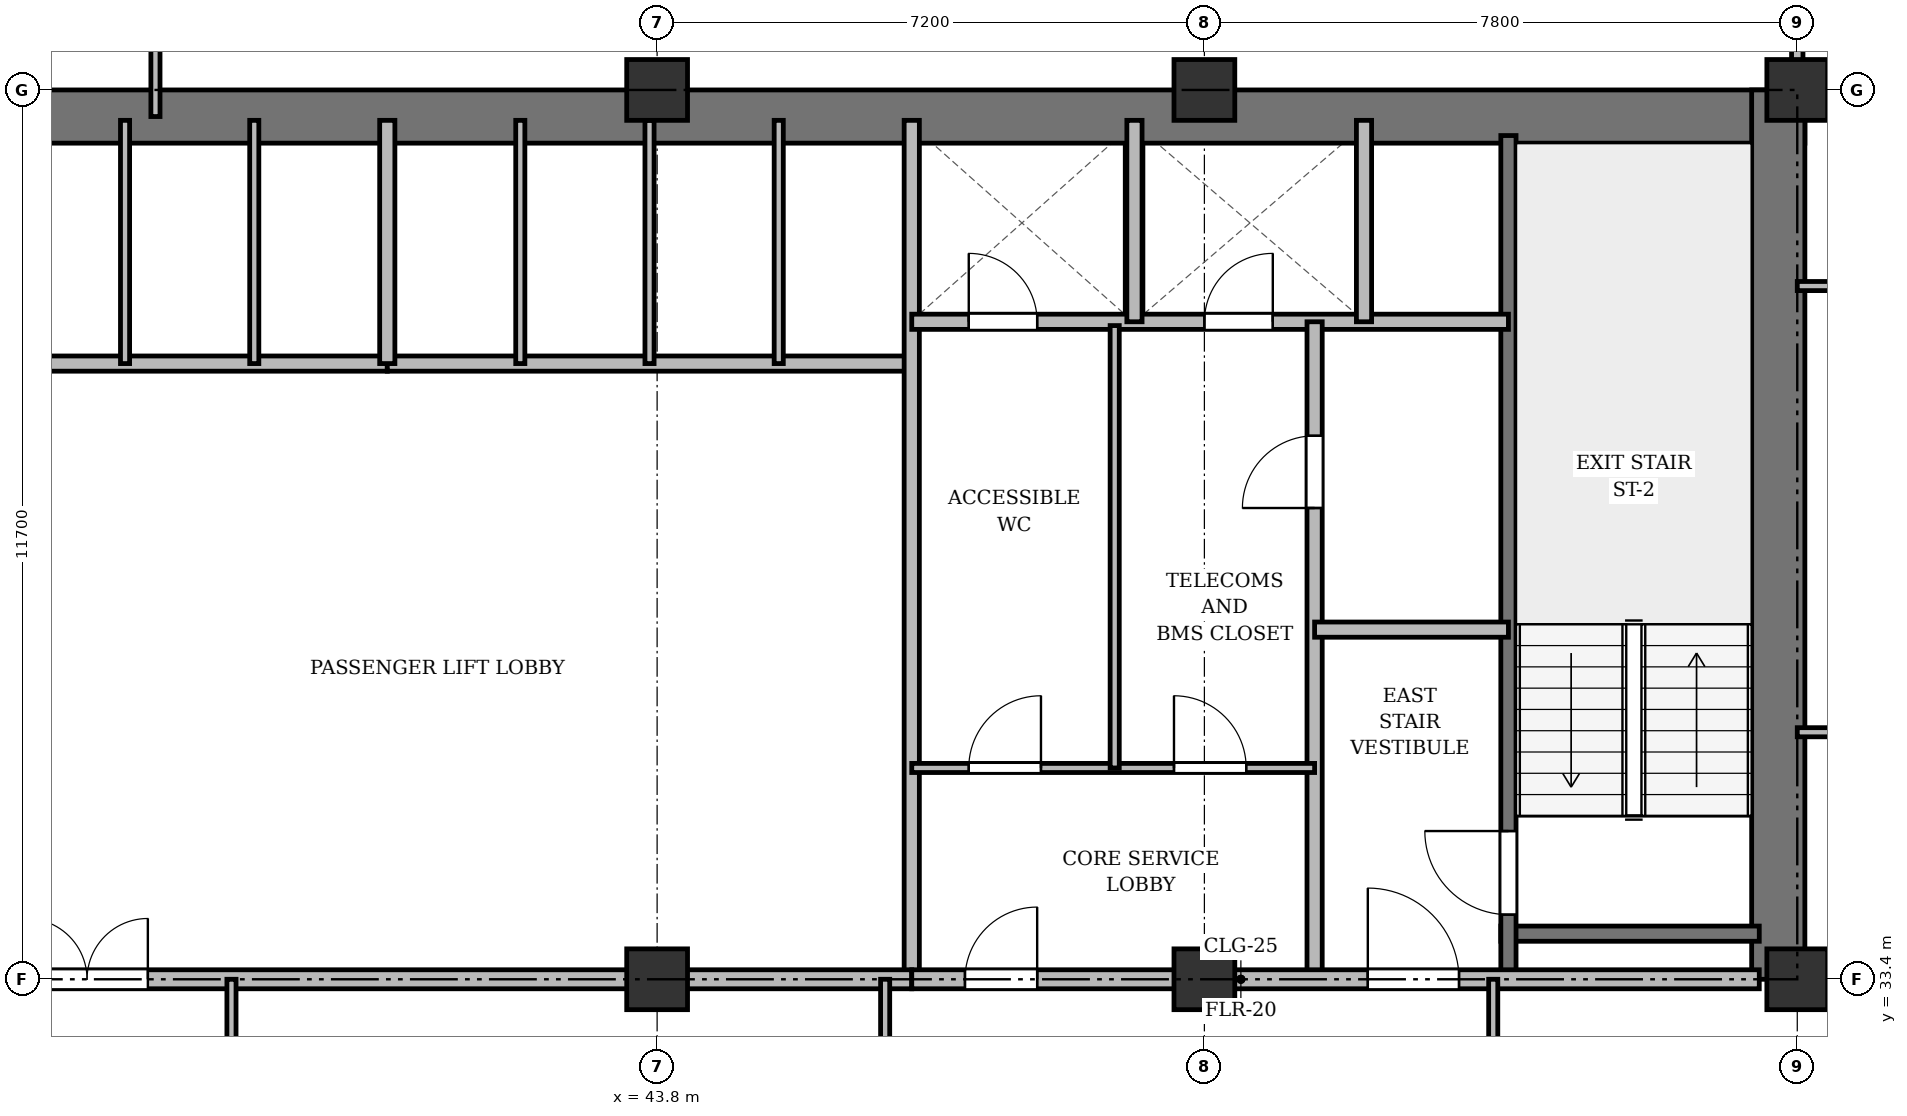
"""IFC4 building model, lengths in metres.
Left out: names, types, materials, properties, quantities, classifications, styles, units other than length and angle.
Written with IfcOpenShell. Run it as: python <this file> out.ifc"""

import sys

from ifc_helpers import new_model, si_unit, direction, frame, frame_2d, origin, origin_2d, place, context, subcontext, project, spatial, rectangle, extrude, source, transform, mapped, element, fill, save


model = new_model("IFC4")
c1 = context("Model", 3, precision=1e-05, world=origin(), true_north=direction((0.0, 1.0)))
c2 = subcontext(c1, "Body", "Model", "MODEL_VIEW")
j1 = project(units=[si_unit("LENGTHUNIT", "METRE"), si_unit("PLANEANGLEUNIT", "RADIAN")], contexts=[c1])
p1 = place(None, origin())
s1 = spatial("IfcSite", under=j1, at=p1, CompositionType="ELEMENT")
p2 = place(p1, origin())
s2 = spatial("IfcBuilding", under=s1, at=p2, CompositionType="ELEMENT")
p3 = place(p2, frame((0.0, 0.0, 81.7)))
s3 = spatial("IfcBuildingStorey", under=s2, at=p3, CompositionType="ELEMENT", Elevation=81.7)
m1 = source(origin(), c2, "Body", "SweptSolid", [
    extrude(rectangle(XDim=0.8, YDim=0.8, at=origin_2d()), origin(), (0.0, 0.0, 1.0), 3.6),
])
for number, where, z_axis, x_axis in (
    (1, (43.8, 33.4, 0.0), (0.0, 0.0, 1.0), (1.0, 0.0, 0.0)),
    (2, (43.8, 45.1, 0.0), (0.0, 0.0, 1.0), (1.0, 0.0, 0.0)),
    (3, (51.0, 33.4, 0.0), (0.0, 0.0, 1.0), (1.0, 0.0, 0.0)),
    (4, (51.0, 45.1, 0.0), (0.0, 0.0, 1.0), (1.0, 0.0, 0.0)),
    (5, (58.8, 33.4, 0.0), (0.0, 0.0, 1.0), (1.0, 0.0, 0.0)),
    (6, (58.8, 45.1, 0.0), (0.0, 0.0, 1.0), (1.0, 0.0, 0.0)),
):
    element("IfcColumn", number, at=place(p3, frame(where, z_axis=z_axis, x_axis=x_axis)), inside=s3, PredefinedType="COLUMN", context=c2, shape_type="MappedRepresentation", body=[
        mapped(m1, transform((0.0, 0.0, 0.0), x_axis=(1.0, 0.0, 0.0), y_axis=(0.0, 1.0, 0.0), z_axis=(0.0, 0.0, 1.0), scale=1.0)),
    ])
p4 = place(p3, frame((15.5, 44.75, 0.0), z_axis=(0.0, 0.0, 1.0), x_axis=(1.0, 0.0, 0.0)))
e7 = element("IfcWall", 7, at=p4, inside=s3, PredefinedType="SHEAR", context=c2, shape_type="SweptSolid", body=[
    extrude(rectangle(XDim=43.4, YDim=0.7, at=frame_2d((21.7, 0.0))), origin(), (0.0, 0.0, 1.0), 3.34),
])
p5 = place(p3, frame((58.55, 33.4, 0.0), z_axis=(0.0, 0.0, 1.0), x_axis=(0.0, 1.0, 0.0)))
e8 = element("IfcWall", 8, at=p5, inside=s3, PredefinedType="SHEAR", context=c2, shape_type="SweptSolid", body=[
    extrude(rectangle(XDim=11.7, YDim=0.7, at=frame_2d((5.85, 0.0))), origin(), (0.0, 0.0, 1.0), 3.34),
])
p6 = place(p3, frame((54.9, 34.0, 0.0), z_axis=(0.0, 0.0, 1.0), x_axis=(1.0, 0.0, 0.0)))
e9 = element("IfcWall", 9, at=p6, inside=s3, PredefinedType="SHEAR", context=c2, shape_type="SweptSolid", body=[
    extrude(rectangle(XDim=3.4, YDim=0.2, at=frame_2d((1.7, 0.0))), origin(), (0.0, 0.0, 1.0), 3.34),
])
p7 = place(p3, frame((55.0, 33.4, 0.0), z_axis=(0.0, 0.0, 1.0), x_axis=(0.0, 1.0, 0.0)))
e10 = element("IfcWall", 10, at=p7, inside=s3, PredefinedType="SHEAR", context=c2, shape_type="SweptSolid", body=[
    extrude(rectangle(XDim=11.1, YDim=0.2, at=frame_2d((5.55, 0.0))), origin(), (0.0, 0.0, 1.0), 3.34),
])
p8 = place(p7, frame((0.85, 0.0, 0.0)))
e11 = element("IfcOpeningElement", 11, at=p8, cuts=e10, PredefinedType="OPENING", context=c2, shape_type="SweptSolid", body=[
    extrude(rectangle(XDim=1.1, YDim=2.15, at=frame_2d((0.55, 1.075))), frame((0.0, 0.11, 0.0), z_axis=(0.0, -1.0, 0.0), x_axis=(1.0, 0.0, 0.0)), (0.0, 0.0, 1.0), 0.22),
])
p9 = place(p3, frame((33.35, 41.5, 0.0), z_axis=(0.0, 0.0, 1.0), x_axis=(1.0, 0.0, 0.0)))
e12 = element("IfcWall", 12, at=p9, inside=s3, PredefinedType="SOLIDWALL", context=c2, shape_type="SweptSolid", body=[
    extrude(rectangle(XDim=6.9, YDim=0.2, at=frame_2d((3.45, 0.0))), origin(), (0.0, 0.0, 1.0), 3.34),
])
for number, where, z_axis, x_axis in (
    (13, (36.8, 41.5, 0.0), (0.0, 0.0, 1.0), (0.0, 1.0, 0.0)),
    (14, (38.5, 41.5, 0.0), (0.0, 0.0, 1.0), (0.0, 1.0, 0.0)),
):
    element("IfcWall", number, at=place(p3, frame(where, z_axis=z_axis, x_axis=x_axis)), inside=s3, PredefinedType="PARTITIONING", context=c2, shape_type="SweptSolid", body=[
        extrude(rectangle(XDim=3.2, YDim=0.12, at=frame_2d((1.6, 0.0))), origin(), (0.0, 0.0, 1.0), 3.34),
    ])
p10 = place(p3, frame((40.25, 41.5, 0.0), z_axis=(0.0, 0.0, 1.0), x_axis=(1.0, 0.0, 0.0)))
e15 = element("IfcWall", 15, at=p10, inside=s3, PredefinedType="SOLIDWALL", context=c2, shape_type="SweptSolid", body=[
    extrude(rectangle(XDim=6.9, YDim=0.2, at=frame_2d((3.45, 0.0))), origin(), (0.0, 0.0, 1.0), 2.84),
])
p11 = place(p3, frame((40.25, 41.5, 0.0), z_axis=(0.0, 0.0, 1.0), x_axis=(0.0, 1.0, 0.0)))
e16 = element("IfcWall", 16, at=p11, inside=s3, PredefinedType="SOLIDWALL", context=c2, shape_type="SweptSolid", body=[
    extrude(rectangle(XDim=3.2, YDim=0.2, at=frame_2d((1.6, 0.0))), origin(), (0.0, 0.0, 1.0), 3.34),
])
p12 = place(p3, frame((42.0, 41.5, 0.0), z_axis=(0.0, 0.0, 1.0), x_axis=(0.0, 1.0, 0.0)))
e17 = element("IfcWall", 17, at=p12, inside=s3, PredefinedType="PARTITIONING", context=c2, shape_type="SweptSolid", body=[
    extrude(rectangle(XDim=3.2, YDim=0.12, at=frame_2d((1.6, 0.0))), origin(), (0.0, 0.0, 1.0), 3.34),
])
p13 = place(p3, frame((43.7, 41.5, 0.0), z_axis=(0.0, 0.0, 1.0), x_axis=(0.0, 1.0, 0.0)))
e18 = element("IfcWall", 18, at=p13, inside=s3, PredefinedType="PARTITIONING", context=c2, shape_type="SweptSolid", body=[
    extrude(rectangle(XDim=3.2, YDim=0.12, at=frame_2d((1.6, 0.0))), origin(), (0.0, 0.0, 1.0), 2.84),
])
p14 = place(p3, frame((45.4, 41.5, 0.0), z_axis=(0.0, 0.0, 1.0), x_axis=(0.0, 1.0, 0.0)))
e19 = element("IfcWall", 19, at=p14, inside=s3, PredefinedType="PARTITIONING", context=c2, shape_type="SweptSolid", body=[
    extrude(rectangle(XDim=3.2, YDim=0.12, at=frame_2d((1.6, 0.0))), origin(), (0.0, 0.0, 1.0), 3.34),
])
p15 = place(p3, frame((47.15, 33.4, 0.0), z_axis=(0.0, 0.0, 1.0), x_axis=(0.0, 1.0, 0.0)))
e20 = element("IfcWall", 20, at=p15, inside=s3, PredefinedType="SOLIDWALL", context=c2, shape_type="SweptSolid", body=[
    extrude(rectangle(XDim=11.3, YDim=0.2, at=frame_2d((5.65, 0.0))), origin(), (0.0, 0.0, 1.0), 2.752),
])
p16 = place(p3, frame((26.3, 33.4, 0.0), z_axis=(0.0, 0.0, 1.0), x_axis=(1.0, 0.0, 0.0)))
e21 = element("IfcWall", 21, at=p16, inside=s3, PredefinedType="PARTITIONING", context=c2, shape_type="SweptSolid", body=[
    extrude(rectangle(XDim=20.85, YDim=0.25, at=frame_2d((10.425, 0.0))), origin(), (0.0, 0.0, 1.0), 2.752),
])
p17 = place(p16, frame((9.2, 0.0, 0.0)))
e22 = element("IfcOpeningElement", 22, at=p17, cuts=e21, PredefinedType="OPENING", context=c2, shape_type="SweptSolid", body=[
    extrude(rectangle(XDim=1.6, YDim=2.2, at=frame_2d((0.8, 1.1))), frame((0.0, 0.135, 0.0), z_axis=(0.0, -1.0, 0.0), x_axis=(1.0, 0.0, 0.0)), (0.0, 0.0, 1.0), 0.27),
])
p18 = place(p3, frame((47.15, 42.05, 0.0), z_axis=(0.0, 0.0, 1.0), x_axis=(1.0, 0.0, 0.0)))
e23 = element("IfcWall", 23, at=p18, inside=s3, PredefinedType="SOLIDWALL", context=c2, shape_type="SweptSolid", body=[
    extrude(rectangle(XDim=7.85, YDim=0.2, at=frame_2d((3.925, 0.0))), origin(), (0.0, 0.0, 1.0), 2.84),
])
p19 = place(p18, frame((0.75, 0.0, 0.0)))
e24 = element("IfcOpeningElement", 24, at=p19, cuts=e23, PredefinedType="OPENING", context=c2, shape_type="SweptSolid", body=[
    extrude(rectangle(XDim=0.9, YDim=2.1, at=frame_2d((0.45, 1.05))), frame((0.0, 0.11, 0.0), z_axis=(0.0, -1.0, 0.0), x_axis=(1.0, 0.0, 0.0)), (0.0, 0.0, 1.0), 0.22),
])
p20 = place(p18, frame((3.85, 0.0, 0.0)))
e25 = element("IfcOpeningElement", 25, at=p20, cuts=e23, PredefinedType="OPENING", context=c2, shape_type="SweptSolid", body=[
    extrude(rectangle(XDim=0.9, YDim=2.1, at=frame_2d((0.45, 1.05))), frame((0.0, 0.11, 0.0), z_axis=(0.0, -1.0, 0.0), x_axis=(1.0, 0.0, 0.0)), (0.0, 0.0, 1.0), 0.22),
])
for number, where, z_axis, x_axis in (
    (26, (50.08, 42.05, 0.0), (0.0, 0.0, 1.0), (0.0, 1.0, 0.0)),
    (27, (53.1, 42.05, 0.0), (0.0, 0.0, 1.0), (0.0, 1.0, 0.0)),
):
    element("IfcWall", number, at=place(p3, frame(where, z_axis=z_axis, x_axis=x_axis)), inside=s3, PredefinedType="SOLIDWALL", context=c2, shape_type="SweptSolid", body=[
        extrude(rectangle(XDim=2.65, YDim=0.2, at=frame_2d((1.325, 0.0))), origin(), (0.0, 0.0, 1.0), 3.34),
    ])
p21 = place(p3, frame((52.45, 33.4, 0.0), z_axis=(0.0, 0.0, 1.0), x_axis=(0.0, 1.0, 0.0)))
e28 = element("IfcWall", 28, at=p21, inside=s3, PredefinedType="PARTITIONING", context=c2, shape_type="SweptSolid", body=[
    extrude(rectangle(XDim=8.65, YDim=0.2, at=frame_2d((4.325, 0.0))), origin(), (0.0, 0.0, 1.0), 2.752),
])
p22 = place(p21, frame((6.2, 0.0, 0.0)))
e29 = element("IfcOpeningElement", 29, at=p22, cuts=e28, PredefinedType="OPENING", context=c2, shape_type="SweptSolid", body=[
    extrude(rectangle(XDim=0.95, YDim=2.15, at=frame_2d((0.475, 1.075))), frame((0.0, 0.11, 0.0), z_axis=(0.0, -1.0, 0.0), x_axis=(1.0, 0.0, 0.0)), (0.0, 0.0, 1.0), 0.22),
])
p23 = place(p3, frame((52.45, 38.0, 0.0), z_axis=(0.0, 0.0, 1.0), x_axis=(1.0, 0.0, 0.0)))
e30 = element("IfcWall", 30, at=p23, inside=s3, PredefinedType="PARTITIONING", context=c2, shape_type="SweptSolid", body=[
    extrude(rectangle(XDim=2.55, YDim=0.2, at=frame_2d((1.275, 0.0))), origin(), (0.0, 0.0, 1.0), 3.34),
])
p24 = place(p3, frame((47.15, 36.18, 0.0), z_axis=(0.0, 0.0, 1.0), x_axis=(1.0, 0.0, 0.0)))
e31 = element("IfcWall", 31, at=p24, inside=s3, PredefinedType="PARTITIONING", context=c2, shape_type="SweptSolid", body=[
    extrude(rectangle(XDim=5.3, YDim=0.12, at=frame_2d((2.65, 0.0))), origin(), (0.0, 0.0, 1.0), 2.84),
])
p25 = place(p24, frame((0.75, 0.0, 0.0)))
e32 = element("IfcOpeningElement", 32, at=p25, cuts=e31, PredefinedType="OPENING", context=c2, shape_type="SweptSolid", body=[
    extrude(rectangle(XDim=0.95, YDim=2.15, at=frame_2d((0.475, 1.075))), frame((0.0, 0.07, 0.0), z_axis=(0.0, -1.0, 0.0), x_axis=(1.0, 0.0, 0.0)), (0.0, 0.0, 1.0), 0.14),
])
p26 = place(p24, frame((3.45, 0.0, 0.0)))
e33 = element("IfcOpeningElement", 33, at=p26, cuts=e31, PredefinedType="OPENING", context=c2, shape_type="SweptSolid", body=[
    extrude(rectangle(XDim=0.95, YDim=2.15, at=frame_2d((0.475, 1.075))), frame((0.0, 0.07, 0.0), z_axis=(0.0, -1.0, 0.0), x_axis=(1.0, 0.0, 0.0)), (0.0, 0.0, 1.0), 0.14),
])
p27 = place(p3, frame((49.82, 36.18, 0.0), z_axis=(0.0, 0.0, 1.0), x_axis=(0.0, 1.0, 0.0)))
e34 = element("IfcWall", 34, at=p27, inside=s3, PredefinedType="PARTITIONING", context=c2, shape_type="SweptSolid", body=[
    extrude(rectangle(XDim=5.82, YDim=0.12, at=frame_2d((2.91, 0.0))), origin(), (0.0, 0.0, 1.0), 3.34),
])
p28 = place(p3, frame((47.15, 33.4, 0.0), z_axis=(0.0, 0.0, 1.0), x_axis=(1.0, 0.0, 0.0)))
e35 = element("IfcWall", 35, at=p28, inside=s3, PredefinedType="PARTITIONING", context=c2, shape_type="SweptSolid", body=[
    extrude(rectangle(XDim=11.15, YDim=0.25, at=frame_2d((5.575, 0.0))), origin(), (0.0, 0.0, 1.0), 2.752),
])
p29 = place(p28, frame((0.7, 0.0, 0.0)))
e36 = element("IfcOpeningElement", 36, at=p29, cuts=e35, PredefinedType="OPENING", context=c2, shape_type="SweptSolid", body=[
    extrude(rectangle(XDim=0.95, YDim=2.15, at=frame_2d((0.475, 1.075))), frame((0.0, 0.135, 0.0), z_axis=(0.0, -1.0, 0.0), x_axis=(1.0, 0.0, 0.0)), (0.0, 0.0, 1.0), 0.27),
])
p30 = place(p28, frame((6.0, 0.0, 0.0)))
e37 = element("IfcOpeningElement", 37, at=p30, cuts=e35, PredefinedType="OPENING", context=c2, shape_type="SweptSolid", body=[
    extrude(rectangle(XDim=1.2, YDim=2.15, at=frame_2d((0.6, 1.075))), frame((0.0, 0.135, 0.0), z_axis=(0.0, -1.0, 0.0), x_axis=(1.0, 0.0, 0.0)), (0.0, 0.0, 1.0), 0.27),
])
for number, where, z_axis, x_axis in (
    (38, (38.2, 29.8, 0.0), (0.0, 0.0, 1.0), (0.0, 1.0, 0.0)),
    (39, (46.8, 29.8, 0.0), (0.0, 0.0, 1.0), (0.0, 1.0, 0.0)),
    (40, (54.8, 29.8, 0.0), (0.0, 0.0, 1.0), (0.0, 1.0, 0.0)),
):
    element("IfcWall", number, at=place(p3, frame(where, z_axis=z_axis, x_axis=x_axis)), inside=s3, PredefinedType="PARTITIONING", context=c2, shape_type="SweptSolid", body=[
        extrude(rectangle(XDim=3.6, YDim=0.12, at=frame_2d((1.8, 0.0))), origin(), (0.0, 0.0, 1.0), 2.752),
    ])
p31 = place(p3, frame((58.8, 36.65, 0.0), z_axis=(0.0, 0.0, 1.0), x_axis=(1.0, 0.0, 0.0)))
e41 = element("IfcWall", 41, at=p31, inside=s3, PredefinedType="PARTITIONING", context=c2, shape_type="SweptSolid", body=[
    extrude(rectangle(XDim=2.45, YDim=0.12, at=frame_2d((1.225, 0.0))), origin(), (0.0, 0.0, 1.0), 2.84),
])
p32 = place(p3, frame((58.8, 42.52, 0.0), z_axis=(0.0, 0.0, 1.0), x_axis=(1.0, 0.0, 0.0)))
e42 = element("IfcWall", 42, at=p32, inside=s3, PredefinedType="PARTITIONING", context=c2, shape_type="SweptSolid", body=[
    extrude(rectangle(XDim=5.425, YDim=0.12, at=frame_2d((2.712, 0.0))), origin(), (0.0, 0.0, 1.0), 2.84),
])
p33 = place(p32, frame((2.423, 0.0, 0.0)))
e43 = element("IfcOpeningElement", 43, at=p33, cuts=e42, PredefinedType="OPENING", context=c2, shape_type="SweptSolid", body=[
    extrude(rectangle(XDim=0.95, YDim=2.15, at=frame_2d((0.475, 1.075))), frame((0.0, 0.07, 0.0), z_axis=(0.0, -1.0, 0.0), x_axis=(1.0, 0.0, 0.0)), (0.0, 0.0, 1.0), 0.14),
])
p34 = place(p3, frame((58.8, 33.4, 0.0), z_axis=(0.0, 0.0, 1.0), x_axis=(1.0, 0.0, 0.0)))
e44 = element("IfcWall", 44, at=p34, inside=s3, PredefinedType="PARTITIONING", context=c2, shape_type="SweptSolid", body=[
    extrude(rectangle(XDim=10.85, YDim=0.15, at=frame_2d((5.425, 0.0))), origin(), (0.0, 0.0, 1.0), 2.752),
])
p35 = place(p34, frame((4.933, 0.0, 0.0)))
e45 = element("IfcOpeningElement", 45, at=p35, cuts=e44, PredefinedType="OPENING", context=c2, shape_type="SweptSolid", body=[
    extrude(rectangle(XDim=0.95, YDim=2.15, at=frame_2d((0.475, 1.075))), frame((0.0, 0.085, 0.0), z_axis=(0.0, -1.0, 0.0), x_axis=(1.0, 0.0, 0.0)), (0.0, 0.0, 1.0), 0.17),
])
p36 = place(p3, frame((37.2, 44.75, 0.0), z_axis=(0.0, 0.0, 1.0), x_axis=(0.0, 1.0, 0.0)))
e46 = element("IfcWall", 46, at=p36, inside=s3, PredefinedType="PARTITIONING", context=c2, shape_type="SweptSolid", body=[
    extrude(rectangle(XDim=3.61, YDim=0.12, at=frame_2d((1.805, 0.0))), origin(), (0.0, 0.0, 1.0), 2.752),
])
p37 = place(p36, frame((1.1, 0.0, 0.0)))
e47 = element("IfcOpeningElement", 47, at=p37, cuts=e46, PredefinedType="OPENING", context=c2, shape_type="SweptSolid", body=[
    extrude(rectangle(XDim=0.95, YDim=2.15, at=frame_2d((0.475, 1.075))), frame((0.0, 0.07, 0.0), z_axis=(0.0, -1.0, 0.0), x_axis=(1.0, 0.0, 0.0)), (0.0, 0.0, 1.0), 0.14),
])
p38 = place(p3, frame((58.8, 44.75, 0.0), z_axis=(0.0, 0.0, 1.0), x_axis=(0.0, 1.0, 0.0)))
e48 = element("IfcWall", 48, at=p38, inside=s3, PredefinedType="PARTITIONING", context=c2, shape_type="SweptSolid", body=[
    extrude(rectangle(XDim=3.61, YDim=0.15, at=frame_2d((1.805, 0.0))), origin(), (0.0, 0.0, 1.0), 2.84),
])
p39 = place(p38, frame((1.1, 0.0, 0.0)))
e49 = element("IfcOpeningElement", 49, at=p39, cuts=e48, PredefinedType="OPENING", context=c2, shape_type="SweptSolid", body=[
    extrude(rectangle(XDim=0.95, YDim=2.15, at=frame_2d((0.475, 1.075))), frame((0.0, 0.085, 0.0), z_axis=(0.0, -1.0, 0.0), x_axis=(1.0, 0.0, 0.0)), (0.0, 0.0, 1.0), 0.17),
])
m2 = source(origin(), c2, "Body", "SweptSolid", [
    extrude(rectangle(XDim=1.1, YDim=2.15, at=frame_2d((0.55, 1.075))), frame((0.0, 0.025, 0.0), z_axis=(0.0, -1.0, 0.0), x_axis=(1.0, 0.0, 0.0)), (0.0, 0.0, 1.0), 0.05),
])
p40 = place(p8, origin())
e50 = element("IfcDoor", 50, at=p40, inside=s3, OperationType="SINGLE_SWING_RIGHT", PredefinedType="DOOR", context=c2, shape_type="MappedRepresentation", body=[
    mapped(m2, transform((0.0, 0.0, 0.0), x_axis=(1.0, 0.0, 0.0), y_axis=(0.0, 1.0, 0.0), z_axis=(0.0, 0.0, 1.0), scale=1.0)),
])
fill(e11, e50)
m3 = source(origin(), c2, "Body", "SweptSolid", [
    extrude(rectangle(XDim=1.6, YDim=2.2, at=frame_2d((0.8, 1.1))), frame((0.0, 0.025, 0.0), z_axis=(0.0, -1.0, 0.0), x_axis=(1.0, 0.0, 0.0)), (0.0, 0.0, 1.0), 0.05),
])
p41 = place(p17, origin())
e51 = element("IfcDoor", 51, at=p41, inside=s3, OperationType="DOUBLE_DOOR_SINGLE_SWING", PredefinedType="DOOR", context=c2, shape_type="MappedRepresentation", body=[
    mapped(m3, transform((0.0, 0.0, 0.0), x_axis=(1.0, 0.0, 0.0), y_axis=(0.0, 1.0, 0.0), z_axis=(0.0, 0.0, 1.0), scale=1.0)),
])
fill(e22, e51)
m4 = source(origin(), c2, "Body", "SweptSolid", [
    extrude(rectangle(XDim=0.9, YDim=2.1, at=frame_2d((0.45, 1.05))), frame((0.0, 0.025, 0.0), z_axis=(0.0, -1.0, 0.0), x_axis=(1.0, 0.0, 0.0)), (0.0, 0.0, 1.0), 0.05),
])
p42 = place(p19, origin())
e52 = element("IfcDoor", 52, at=p42, inside=s3, OperationType="SINGLE_SWING_LEFT", PredefinedType="DOOR", context=c2, shape_type="MappedRepresentation", body=[
    mapped(m4, transform((0.0, 0.0, 0.0), x_axis=(1.0, 0.0, 0.0), y_axis=(0.0, 1.0, 0.0), z_axis=(0.0, 0.0, 1.0), scale=1.0)),
])
fill(e24, e52)
p43 = place(p20, origin())
e53 = element("IfcDoor", 53, at=p43, inside=s3, OperationType="SINGLE_SWING_RIGHT", PredefinedType="DOOR", context=c2, shape_type="MappedRepresentation", body=[
    mapped(m4, transform((0.0, 0.0, 0.0), x_axis=(1.0, 0.0, 0.0), y_axis=(0.0, 1.0, 0.0), z_axis=(0.0, 0.0, 1.0), scale=1.0)),
])
fill(e25, e53)
m5 = source(origin(), c2, "Body", "SweptSolid", [
    extrude(rectangle(XDim=0.95, YDim=2.15, at=frame_2d((0.475, 1.075))), frame((0.0, 0.025, 0.0), z_axis=(0.0, -1.0, 0.0), x_axis=(1.0, 0.0, 0.0)), (0.0, 0.0, 1.0), 0.05),
])
p44 = place(p22, origin())
e54 = element("IfcDoor", 54, at=p44, inside=s3, OperationType="SINGLE_SWING_LEFT", PredefinedType="DOOR", context=c2, shape_type="MappedRepresentation", body=[
    mapped(m5, transform((0.0, 0.0, 0.0), x_axis=(1.0, 0.0, 0.0), y_axis=(0.0, 1.0, 0.0), z_axis=(0.0, 0.0, 1.0), scale=1.0)),
])
fill(e29, e54)
p45 = place(p25, origin())
e55 = element("IfcDoor", 55, at=p45, inside=s3, OperationType="SINGLE_SWING_RIGHT", PredefinedType="DOOR", context=c2, shape_type="MappedRepresentation", body=[
    mapped(m5, transform((0.0, 0.0, 0.0), x_axis=(1.0, 0.0, 0.0), y_axis=(0.0, 1.0, 0.0), z_axis=(0.0, 0.0, 1.0), scale=1.0)),
])
fill(e32, e55)
p46 = place(p26, origin())
e56 = element("IfcDoor", 56, at=p46, inside=s3, OperationType="SINGLE_SWING_LEFT", PredefinedType="DOOR", context=c2, shape_type="MappedRepresentation", body=[
    mapped(m5, transform((0.0, 0.0, 0.0), x_axis=(1.0, 0.0, 0.0), y_axis=(0.0, 1.0, 0.0), z_axis=(0.0, 0.0, 1.0), scale=1.0)),
])
fill(e33, e56)
p47 = place(p29, origin())
e57 = element("IfcDoor", 57, at=p47, inside=s3, OperationType="SINGLE_SWING_RIGHT", PredefinedType="DOOR", context=c2, shape_type="MappedRepresentation", body=[
    mapped(m5, transform((0.0, 0.0, 0.0), x_axis=(1.0, 0.0, 0.0), y_axis=(0.0, 1.0, 0.0), z_axis=(0.0, 0.0, 1.0), scale=1.0)),
])
fill(e36, e57)
m6 = source(origin(), c2, "Body", "SweptSolid", [
    extrude(rectangle(XDim=1.2, YDim=2.15, at=frame_2d((0.6, 1.075))), frame((0.0, 0.025, 0.0), z_axis=(0.0, -1.0, 0.0), x_axis=(1.0, 0.0, 0.0)), (0.0, 0.0, 1.0), 0.05),
])
p48 = place(p30, origin())
e58 = element("IfcDoor", 58, at=p48, inside=s3, OperationType="SINGLE_SWING_LEFT", PredefinedType="DOOR", context=c2, shape_type="MappedRepresentation", body=[
    mapped(m6, transform((0.0, 0.0, 0.0), x_axis=(1.0, 0.0, 0.0), y_axis=(0.0, 1.0, 0.0), z_axis=(0.0, 0.0, 1.0), scale=1.0)),
])
fill(e37, e58)
save(model, sys.argv[1])
